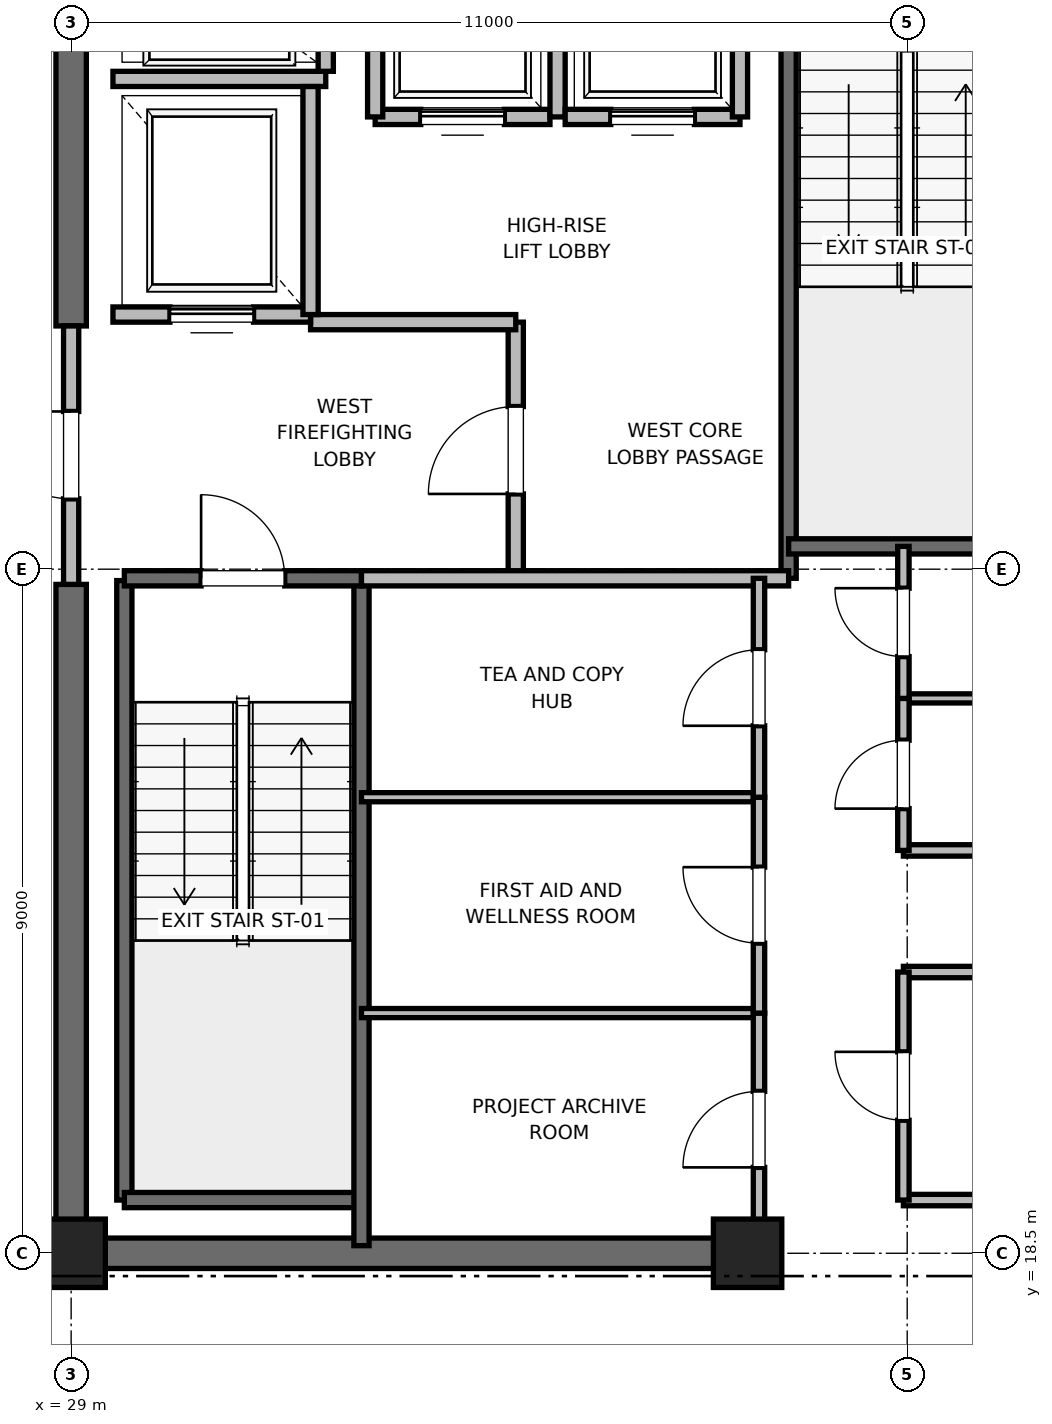
"""IFC4 building model, lengths in metres.
Left out: names, types, materials, properties, quantities, classifications, styles, units other than length and angle.
Written with IfcOpenShell. Run it as: python <this file> out.ifc"""

import sys

from ifc_helpers import new_model, si_unit, direction, frame, frame_2d, origin, origin_2d, place, context, subcontext, project, spatial, rectangle, extrude, element, fill, save


model = new_model("IFC4")
c1 = context("Model", 3, precision=1e-05, world=origin(), true_north=direction((0.0, 1.0)))
c2 = subcontext(c1, "Body", "Model", "MODEL_VIEW")
j1 = project(units=[si_unit("LENGTHUNIT", "METRE"), si_unit("PLANEANGLEUNIT", "RADIAN")], contexts=[c1])
p1 = place(None, origin())
s1 = spatial("IfcSite", under=j1, at=p1, CompositionType="ELEMENT")
p2 = place(p1, origin())
s2 = spatial("IfcBuilding", under=s1, at=p2, CompositionType="ELEMENT")
p3 = place(p2, frame((0.0, 0.0, 306.8)))
s3 = spatial("IfcBuildingStorey", under=s2, at=p3, CompositionType="ELEMENT", Elevation=306.8)
for number, where, z_axis, x_axis in (
    (1, (29.0, 18.5, 0.0), (0.0, 0.0, 1.0), (1.0, 0.0, 0.0)),
    (2, (37.9, 18.5, 0.0), (0.0, 0.0, 1.0), (1.0, 0.0, 0.0)),
):
    element("IfcColumn", number, at=place(p3, frame(where, z_axis=z_axis, x_axis=x_axis)), inside=s3, PredefinedType="PILASTER", context=c2, shape_type="SweptSolid", body=[
        extrude(rectangle(XDim=0.9, YDim=0.9, at=origin_2d()), origin(), (0.0, 0.0, 1.0), 4.0),
    ])
p4 = place(p3, frame((29.0, 18.5, 0.0), z_axis=(0.0, 0.0, 1.0), x_axis=(1.0, 0.0, 0.0)))
e3 = element("IfcWall", 3, at=p4, inside=s3, PredefinedType="SHEAR", context=c2, shape_type="SweptSolid", body=[
    extrude(rectangle(XDim=9.2, YDim=0.4, at=frame_2d((4.6, 0.0))), origin(), (0.0, 0.0, 1.0), 3.785),
])
p5 = place(p3, frame((29.0, 18.5, 0.0), z_axis=(0.0, 0.0, 1.0), x_axis=(0.0, 1.0, 0.0)))
e4 = element("IfcWall", 4, at=p5, inside=s3, PredefinedType="SHEAR", context=c2, shape_type="SweptSolid", body=[
    extrude(rectangle(XDim=8.8, YDim=0.4, at=frame_2d((4.4, 0.0))), origin(), (0.0, 0.0, 1.0), 3.785),
])
p6 = place(p3, frame((29.0, 30.7, 0.0), z_axis=(0.0, 0.0, 1.0), x_axis=(0.0, 1.0, 0.0)))
e5 = element("IfcWall", 5, at=p6, inside=s3, PredefinedType="SHEAR", context=c2, shape_type="SweptSolid", body=[
    extrude(rectangle(XDim=5.8, YDim=0.4, at=frame_2d((2.9, 0.0))), origin(), (0.0, 0.0, 1.0), 3.785),
])
p7 = place(p3, frame((29.7, 19.2, 0.0), z_axis=(0.0, 0.0, 1.0), x_axis=(0.0, 1.0, 0.0)))
e6 = element("IfcWall", 6, at=p7, inside=s3, PredefinedType="SOLIDWALL", context=c2, shape_type="SweptSolid", body=[
    extrude(rectangle(XDim=8.15, YDim=0.2, at=frame_2d((4.075, 0.0))), origin(), (0.0, 0.0, 1.0), 3.785),
])
p8 = place(p3, frame((29.7, 19.2, 0.0), z_axis=(0.0, 0.0, 1.0), x_axis=(1.0, 0.0, 0.0)))
e7 = element("IfcWall", 7, at=p8, inside=s3, PredefinedType="SOLIDWALL", context=c2, shape_type="SweptSolid", body=[
    extrude(rectangle(XDim=3.12, YDim=0.2, at=frame_2d((1.56, 0.0))), origin(), (0.0, 0.0, 1.0), 3.785),
])
p9 = place(p3, frame((32.82, 18.6, 0.0), z_axis=(0.0, 0.0, 1.0), x_axis=(0.0, 1.0, 0.0)))
e8 = element("IfcWall", 8, at=p9, inside=s3, PredefinedType="SOLIDWALL", context=c2, shape_type="SweptSolid", body=[
    extrude(rectangle(XDim=8.78, YDim=0.2, at=frame_2d((4.39, 0.0))), origin(), (0.0, 0.0, 1.0), 3.785),
])
p10 = place(p3, frame((29.7, 27.38, 0.0), z_axis=(0.0, 0.0, 1.0), x_axis=(1.0, 0.0, 0.0)))
e9 = element("IfcWall", 9, at=p10, inside=s3, PredefinedType="SOLIDWALL", context=c2, shape_type="SweptSolid", body=[
    extrude(rectangle(XDim=3.12, YDim=0.2, at=frame_2d((1.56, 0.0))), origin(), (0.0, 0.0, 1.0), 3.785),
])
p11 = place(p10, frame((1.01, 0.0, 0.0)))
e10 = element("IfcOpeningElement", 10, at=p11, cuts=e9, PredefinedType="OPENING", context=c2, shape_type="SweptSolid", body=[
    extrude(rectangle(XDim=1.1, YDim=2.15, at=frame_2d((0.55, 1.075))), frame((0.0, 0.1, 0.0), z_axis=(0.0, -1.0, 0.0), x_axis=(1.0, 0.0, 0.0)), (0.0, 0.0, 1.0), 0.2),
])
p12 = place(p3, frame((38.44, 27.38, 0.0), z_axis=(0.0, 0.0, 1.0), x_axis=(0.0, 1.0, 0.0)))
e11 = element("IfcWall", 11, at=p12, inside=s3, PredefinedType="SOLIDWALL", context=c2, shape_type="SweptSolid", body=[
    extrude(rectangle(XDim=8.87, YDim=0.2, at=frame_2d((4.435, 0.0))), origin(), (0.0, 0.0, 1.0), 3.785),
])
p13 = place(p3, frame((38.44, 27.8, 0.0), z_axis=(0.0, 0.0, 1.0), x_axis=(1.0, 0.0, 0.0)))
e12 = element("IfcWall", 12, at=p13, inside=s3, PredefinedType="SOLIDWALL", context=c2, shape_type="SweptSolid", body=[
    extrude(rectangle(XDim=3.32, YDim=0.2, at=frame_2d((1.66, 0.0))), origin(), (0.0, 0.0, 1.0), 3.785),
])
p14 = place(p3, frame((34.85, 27.38, 0.0), z_axis=(0.0, 0.0, 1.0), x_axis=(0.0, 1.0, 0.0)))
e13 = element("IfcWall", 13, at=p14, inside=s3, PredefinedType="PARTITIONING", context=c2, shape_type="SweptSolid", body=[
    extrude(rectangle(XDim=3.37, YDim=0.2, at=frame_2d((1.685, 0.0))), origin(), (0.0, 0.0, 1.0), 3.785),
])
p15 = place(p14, frame((1.11, 0.0, 0.0)))
e14 = element("IfcOpeningElement", 14, at=p15, cuts=e13, PredefinedType="OPENING", context=c2, shape_type="SweptSolid", body=[
    extrude(rectangle(XDim=1.15, YDim=2.2, at=frame_2d((0.575, 1.1))), frame((0.0, 0.1, 0.0), z_axis=(0.0, -1.0, 0.0), x_axis=(1.0, 0.0, 0.0)), (0.0, 0.0, 1.0), 0.2),
])
p16 = place(p3, frame((29.0, 27.3, 0.0), z_axis=(0.0, 0.0, 1.0), x_axis=(0.0, 1.0, 0.0)))
e15 = element("IfcWall", 15, at=p16, inside=s3, PredefinedType="PARTITIONING", context=c2, shape_type="SweptSolid", body=[
    extrude(rectangle(XDim=3.4, YDim=0.2, at=frame_2d((1.7, 0.0))), origin(), (0.0, 0.0, 1.0), 2.865),
])
p17 = place(p16, frame((1.125, 0.0, 0.0)))
e16 = element("IfcOpeningElement", 16, at=p17, cuts=e15, PredefinedType="OPENING", context=c2, shape_type="SweptSolid", body=[
    extrude(rectangle(XDim=1.15, YDim=2.2, at=frame_2d((0.575, 1.1))), frame((0.0, 0.1, 0.0), z_axis=(0.0, -1.0, 0.0), x_axis=(1.0, 0.0, 0.0)), (0.0, 0.0, 1.0), 0.2),
])
p18 = place(p3, frame((32.82, 27.38, 0.0), z_axis=(0.0, 0.0, 1.0), x_axis=(1.0, 0.0, 0.0)))
e17 = element("IfcWall", 17, at=p18, inside=s3, PredefinedType="PARTITIONING", context=c2, shape_type="SweptSolid", body=[
    extrude(rectangle(XDim=5.62, YDim=0.2, at=frame_2d((2.81, 0.0))), origin(), (0.0, 0.0, 1.0), 3.785),
])
p19 = place(p3, frame((32.15, 30.75, 0.0), z_axis=(0.0, 0.0, 1.0), x_axis=(1.0, 0.0, 0.0)))
e18 = element("IfcWall", 18, at=p19, inside=s3, PredefinedType="PARTITIONING", context=c2, shape_type="SweptSolid", body=[
    extrude(rectangle(XDim=2.7, YDim=0.2, at=frame_2d((1.35, 0.0))), origin(), (0.0, 0.0, 1.0), 3.785),
])
p20 = place(p3, frame((29.55, 30.85, 0.0), z_axis=(0.0, 0.0, 1.0), x_axis=(1.0, 0.0, 0.0)))
e19 = element("IfcWall", 19, at=p20, inside=s3, PredefinedType="SOLIDWALL", context=c2, shape_type="SweptSolid", body=[
    extrude(rectangle(XDim=2.6, YDim=0.2, at=frame_2d((1.3, 0.0))), origin(), (0.0, 0.0, 1.0), 2.865),
])
p21 = place(p20, frame((0.75, 0.0, 0.0)))
e20 = element("IfcOpeningElement", 20, at=p21, cuts=e19, PredefinedType="OPENING", context=c2, shape_type="SweptSolid", body=[
    extrude(rectangle(XDim=1.1, YDim=2.2, at=frame_2d((0.55, 1.1))), frame((0.0, 0.1, 0.0), z_axis=(0.0, -1.0, 0.0), x_axis=(1.0, 0.0, 0.0)), (0.0, 0.0, 1.0), 0.2),
])
p22 = place(p3, frame((29.55, 33.95, 0.0), z_axis=(0.0, 0.0, 1.0), x_axis=(1.0, 0.0, 0.0)))
e21 = element("IfcWall", 21, at=p22, inside=s3, PredefinedType="SOLIDWALL", context=c2, shape_type="SweptSolid", body=[
    extrude(rectangle(XDim=2.8, YDim=0.2, at=frame_2d((1.4, 0.0))), origin(), (0.0, 0.0, 1.0), 3.785),
])
p23 = place(p3, frame((32.15, 30.85, 0.0), z_axis=(0.0, 0.0, 1.0), x_axis=(0.0, 1.0, 0.0)))
e22 = element("IfcWall", 22, at=p23, inside=s3, PredefinedType="SOLIDWALL", context=c2, shape_type="SweptSolid", body=[
    extrude(rectangle(XDim=3.0, YDim=0.2, at=frame_2d((1.5, 0.0))), origin(), (0.0, 0.0, 1.0), 3.785),
])
p24 = place(p3, frame((32.35, 34.05, 0.0), z_axis=(0.0, 0.0, 1.0), x_axis=(0.0, 1.0, 0.0)))
e23 = element("IfcWall", 23, at=p24, inside=s3, PredefinedType="SOLIDWALL", context=c2, shape_type="SweptSolid", body=[
    extrude(rectangle(XDim=2.1, YDim=0.2, at=frame_2d((1.05, 0.0))), origin(), (0.0, 0.0, 1.0), 3.785),
])
p25 = place(p24, frame((0.5, 0.0, 0.0)))
e24 = element("IfcOpeningElement", 24, at=p25, cuts=e23, PredefinedType="OPENING", context=c2, shape_type="SweptSolid", body=[
    extrude(rectangle(XDim=1.1, YDim=2.2, at=frame_2d((0.55, 1.1))), frame((0.0, 0.1, 0.0), z_axis=(0.0, -1.0, 0.0), x_axis=(1.0, 0.0, 0.0)), (0.0, 0.0, 1.0), 0.2),
])
p26 = place(p3, frame((33.0, 33.45, 0.0), z_axis=(0.0, 0.0, 1.0), x_axis=(1.0, 0.0, 0.0)))
e25 = element("IfcWall", 25, at=p26, inside=s3, PredefinedType="SOLIDWALL", context=c2, shape_type="SweptSolid", body=[
    extrude(rectangle(XDim=2.3, YDim=0.2, at=frame_2d((1.15, 0.0))), origin(), (0.0, 0.0, 1.0), 3.785),
])
p27 = place(p26, frame((0.6, 0.0, 0.0)))
e26 = element("IfcOpeningElement", 26, at=p27, cuts=e25, PredefinedType="OPENING", context=c2, shape_type="SweptSolid", body=[
    extrude(rectangle(XDim=1.1, YDim=2.2, at=frame_2d((0.55, 1.1))), frame((0.0, 0.1, 0.0), z_axis=(0.0, -1.0, 0.0), x_axis=(1.0, 0.0, 0.0)), (0.0, 0.0, 1.0), 0.2),
])
p28 = place(p3, frame((33.0, 36.05, 0.0), z_axis=(0.0, 0.0, 1.0), x_axis=(0.0, -1.0, 0.0)))
e27 = element("IfcWall", 27, at=p28, inside=s3, PredefinedType="SOLIDWALL", context=c2, shape_type="SweptSolid", body=[
    extrude(rectangle(XDim=2.6, YDim=0.2, at=frame_2d((1.3, 0.0))), origin(), (0.0, 0.0, 1.0), 3.785),
])
p29 = place(p3, frame((35.4, 33.45, 0.0), z_axis=(0.0, 0.0, 1.0), x_axis=(0.0, 1.0, 0.0)))
e28 = element("IfcWall", 28, at=p29, inside=s3, PredefinedType="SOLIDWALL", context=c2, shape_type="SweptSolid", body=[
    extrude(rectangle(XDim=2.6, YDim=0.2, at=frame_2d((1.3, 0.0))), origin(), (0.0, 0.0, 1.0), 2.865),
])
p30 = place(p3, frame((35.5, 33.45, 0.0), z_axis=(0.0, 0.0, 1.0), x_axis=(1.0, 0.0, 0.0)))
e29 = element("IfcWall", 29, at=p30, inside=s3, PredefinedType="SOLIDWALL", context=c2, shape_type="SweptSolid", body=[
    extrude(rectangle(XDim=2.3, YDim=0.2, at=frame_2d((1.15, 0.0))), origin(), (0.0, 0.0, 1.0), 3.785),
])
p31 = place(p30, frame((0.6, 0.0, 0.0)))
e30 = element("IfcOpeningElement", 30, at=p31, cuts=e29, PredefinedType="OPENING", context=c2, shape_type="SweptSolid", body=[
    extrude(rectangle(XDim=1.1, YDim=2.2, at=frame_2d((0.55, 1.1))), frame((0.0, 0.1, 0.0), z_axis=(0.0, -1.0, 0.0), x_axis=(1.0, 0.0, 0.0)), (0.0, 0.0, 1.0), 0.2),
])
p32 = place(p3, frame((37.8, 33.45, 0.0), z_axis=(0.0, 0.0, 1.0), x_axis=(0.0, 1.0, 0.0)))
e31 = element("IfcWall", 31, at=p32, inside=s3, PredefinedType="SOLIDWALL", context=c2, shape_type="SweptSolid", body=[
    extrude(rectangle(XDim=2.6, YDim=0.2, at=frame_2d((1.3, 0.0))), origin(), (0.0, 0.0, 1.0), 2.865),
])
for number, where, z_axis, x_axis in (
    (32, (39.95, 19.2, 0.0), (0.0, 0.0, 1.0), (1.0, 0.0, 0.0)),
    (33, (39.95, 22.2, 0.0), (0.0, 0.0, 1.0), (1.0, 0.0, 0.0)),
    (34, (39.95, 23.8, 0.0), (0.0, 0.0, 1.0), (1.0, 0.0, 0.0)),
):
    element("IfcWall", number, at=place(p3, frame(where, z_axis=z_axis, x_axis=x_axis)), inside=s3, PredefinedType="PARTITIONING", context=c2, shape_type="SweptSolid", body=[
        extrude(rectangle(XDim=1.81, YDim=0.15, at=frame_2d((0.905, 0.0))), origin(), (0.0, 0.0, 1.0), 2.85),
    ])
p33 = place(p3, frame((39.95, 25.8, 0.0), z_axis=(0.0, 0.0, 1.0), x_axis=(1.0, 0.0, 0.0)))
e35 = element("IfcWall", 35, at=p33, inside=s3, PredefinedType="PARTITIONING", context=c2, shape_type="SweptSolid", body=[
    extrude(rectangle(XDim=1.81, YDim=0.12, at=frame_2d((0.905, 0.0))), origin(), (0.0, 0.0, 1.0), 2.85),
])
p34 = place(p3, frame((39.95, 19.2, 0.0), z_axis=(0.0, 0.0, 1.0), x_axis=(0.0, 1.0, 0.0)))
e36 = element("IfcWall", 36, at=p34, inside=s3, PredefinedType="PARTITIONING", context=c2, shape_type="SweptSolid", body=[
    extrude(rectangle(XDim=3.0, YDim=0.15, at=frame_2d((1.5, 0.0))), origin(), (0.0, 0.0, 1.0), 2.85),
])
p35 = place(p34, frame((1.05, 0.0, 0.0)))
e37 = element("IfcOpeningElement", 37, at=p35, cuts=e36, PredefinedType="OPENING", context=c2, shape_type="SweptSolid", body=[
    extrude(rectangle(XDim=0.9, YDim=2.1, at=frame_2d((0.45, 1.05))), frame((0.0, 0.075, 0.0), z_axis=(0.0, -1.0, 0.0), x_axis=(1.0, 0.0, 0.0)), (0.0, 0.0, 1.0), 0.15),
])
p36 = place(p3, frame((39.95, 23.8, 0.0), z_axis=(0.0, 0.0, 1.0), x_axis=(0.0, 1.0, 0.0)))
e38 = element("IfcWall", 38, at=p36, inside=s3, PredefinedType="PARTITIONING", context=c2, shape_type="SweptSolid", body=[
    extrude(rectangle(XDim=2.0, YDim=0.15, at=frame_2d((1.0, 0.0))), origin(), (0.0, 0.0, 1.0), 2.85),
])
p37 = place(p36, frame((0.55, 0.0, 0.0)))
e39 = element("IfcOpeningElement", 39, at=p37, cuts=e38, PredefinedType="OPENING", context=c2, shape_type="SweptSolid", body=[
    extrude(rectangle(XDim=0.9, YDim=2.1, at=frame_2d((0.45, 1.05))), frame((0.0, 0.075, 0.0), z_axis=(0.0, -1.0, 0.0), x_axis=(1.0, 0.0, 0.0)), (0.0, 0.0, 1.0), 0.15),
])
p38 = place(p3, frame((39.95, 25.8, 0.0), z_axis=(0.0, 0.0, 1.0), x_axis=(0.0, 1.0, 0.0)))
e40 = element("IfcWall", 40, at=p38, inside=s3, PredefinedType="PARTITIONING", context=c2, shape_type="SweptSolid", body=[
    extrude(rectangle(XDim=2.0, YDim=0.15, at=frame_2d((1.0, 0.0))), origin(), (0.0, 0.0, 1.0), 2.85),
])
p39 = place(p38, frame((0.55, 0.0, 0.0)))
e41 = element("IfcOpeningElement", 41, at=p39, cuts=e40, PredefinedType="OPENING", context=c2, shape_type="SweptSolid", body=[
    extrude(rectangle(XDim=0.9, YDim=2.1, at=frame_2d((0.45, 1.05))), frame((0.0, 0.075, 0.0), z_axis=(0.0, -1.0, 0.0), x_axis=(1.0, 0.0, 0.0)), (0.0, 0.0, 1.0), 0.15),
])
for number, where, z_axis, x_axis in (
    (42, (32.82, 21.66, 0.0), (0.0, 0.0, 1.0), (1.0, 0.0, 0.0)),
    (43, (32.82, 24.5, 0.0), (0.0, 0.0, 1.0), (1.0, 0.0, 0.0)),
):
    element("IfcWall", number, at=place(p3, frame(where, z_axis=z_axis, x_axis=x_axis)), inside=s3, PredefinedType="PARTITIONING", context=c2, shape_type="SweptSolid", body=[
        extrude(rectangle(XDim=5.23, YDim=0.12, at=frame_2d((2.615, 0.0))), origin(), (0.0, 0.0, 1.0), 2.85),
    ])
p40 = place(p3, frame((38.05, 18.6, 0.0), z_axis=(0.0, 0.0, 1.0), x_axis=(0.0, 1.0, 0.0)))
e44 = element("IfcWall", 44, at=p40, inside=s3, PredefinedType="PARTITIONING", context=c2, shape_type="SweptSolid", body=[
    extrude(rectangle(XDim=3.06, YDim=0.15, at=frame_2d((1.53, 0.0))), origin(), (0.0, 0.0, 1.0), 2.85),
])
p41 = place(p40, frame((1.03, 0.0, 0.0)))
e45 = element("IfcOpeningElement", 45, at=p41, cuts=e44, PredefinedType="OPENING", context=c2, shape_type="SweptSolid", body=[
    extrude(rectangle(XDim=1.0, YDim=2.15, at=frame_2d((0.5, 1.075))), frame((0.0, 0.075, 0.0), z_axis=(0.0, -1.0, 0.0), x_axis=(1.0, 0.0, 0.0)), (0.0, 0.0, 1.0), 0.15),
])
p42 = place(p3, frame((38.05, 21.66, 0.0), z_axis=(0.0, 0.0, 1.0), x_axis=(0.0, 1.0, 0.0)))
e46 = element("IfcWall", 46, at=p42, inside=s3, PredefinedType="PARTITIONING", context=c2, shape_type="SweptSolid", body=[
    extrude(rectangle(XDim=2.84, YDim=0.15, at=frame_2d((1.42, 0.0))), origin(), (0.0, 0.0, 1.0), 2.85),
])
p43 = place(p42, frame((0.92, 0.0, 0.0)))
e47 = element("IfcOpeningElement", 47, at=p43, cuts=e46, PredefinedType="OPENING", context=c2, shape_type="SweptSolid", body=[
    extrude(rectangle(XDim=1.0, YDim=2.15, at=frame_2d((0.5, 1.075))), frame((0.0, 0.075, 0.0), z_axis=(0.0, -1.0, 0.0), x_axis=(1.0, 0.0, 0.0)), (0.0, 0.0, 1.0), 0.15),
])
p44 = place(p3, frame((38.05, 24.5, 0.0), z_axis=(0.0, 0.0, 1.0), x_axis=(0.0, 1.0, 0.0)))
e48 = element("IfcWall", 48, at=p44, inside=s3, PredefinedType="PARTITIONING", context=c2, shape_type="SweptSolid", body=[
    extrude(rectangle(XDim=2.88, YDim=0.15, at=frame_2d((1.44, 0.0))), origin(), (0.0, 0.0, 1.0), 2.85),
])
p45 = place(p44, frame((0.94, 0.0, 0.0)))
e49 = element("IfcOpeningElement", 49, at=p45, cuts=e48, PredefinedType="OPENING", context=c2, shape_type="SweptSolid", body=[
    extrude(rectangle(XDim=1.0, YDim=2.15, at=frame_2d((0.5, 1.075))), frame((0.0, 0.075, 0.0), z_axis=(0.0, -1.0, 0.0), x_axis=(1.0, 0.0, 0.0)), (0.0, 0.0, 1.0), 0.15),
])
p46 = place(p11, origin())
e50 = element("IfcDoor", 50, at=p46, inside=s3, OperationType="SINGLE_SWING_LEFT", PredefinedType="DOOR", context=c2, shape_type="SweptSolid", body=[
    extrude(rectangle(XDim=1.1, YDim=2.15, at=frame_2d((0.55, 1.075))), frame((0.0, 0.025, 0.0), z_axis=(0.0, -1.0, 0.0), x_axis=(1.0, 0.0, 0.0)), (0.0, 0.0, 1.0), 0.05),
])
fill(e10, e50)
p47 = place(p15, origin())
e51 = element("IfcDoor", 51, at=p47, inside=s3, OperationType="SINGLE_SWING_LEFT", PredefinedType="DOOR", context=c2, shape_type="SweptSolid", body=[
    extrude(rectangle(XDim=1.15, YDim=2.2, at=frame_2d((0.575, 1.1))), frame((0.0, 0.025, 0.0), z_axis=(0.0, -1.0, 0.0), x_axis=(1.0, 0.0, 0.0)), (0.0, 0.0, 1.0), 0.05),
])
fill(e14, e51)
p48 = place(p17, origin())
e52 = element("IfcDoor", 52, at=p48, inside=s3, OperationType="SINGLE_SWING_RIGHT", PredefinedType="DOOR", context=c2, shape_type="SweptSolid", body=[
    extrude(rectangle(XDim=1.15, YDim=2.2, at=frame_2d((0.575, 1.1))), frame((0.0, 0.025, 0.0), z_axis=(0.0, -1.0, 0.0), x_axis=(1.0, 0.0, 0.0)), (0.0, 0.0, 1.0), 0.05),
])
fill(e16, e52)
p49 = place(p21, origin())
e53 = element("IfcDoor", 53, at=p49, inside=s3, OperationType="SLIDING_TO_RIGHT", PredefinedType="DOOR", context=c2, shape_type="SweptSolid", body=[
    extrude(rectangle(XDim=1.1, YDim=2.2, at=frame_2d((0.55, 1.1))), frame((0.0, 0.025, 0.0), z_axis=(0.0, -1.0, 0.0), x_axis=(1.0, 0.0, 0.0)), (0.0, 0.0, 1.0), 0.05),
])
fill(e20, e53)
p50 = place(p27, origin())
e54 = element("IfcDoor", 54, at=p50, inside=s3, OperationType="SLIDING_TO_RIGHT", PredefinedType="DOOR", context=c2, shape_type="SweptSolid", body=[
    extrude(rectangle(XDim=1.1, YDim=2.2, at=frame_2d((0.55, 1.1))), frame((0.0, 0.025, 0.0), z_axis=(0.0, -1.0, 0.0), x_axis=(1.0, 0.0, 0.0)), (0.0, 0.0, 1.0), 0.05),
])
fill(e26, e54)
p51 = place(p31, origin())
e55 = element("IfcDoor", 55, at=p51, inside=s3, OperationType="SLIDING_TO_RIGHT", PredefinedType="DOOR", context=c2, shape_type="SweptSolid", body=[
    extrude(rectangle(XDim=1.1, YDim=2.2, at=frame_2d((0.55, 1.1))), frame((0.0, 0.025, 0.0), z_axis=(0.0, -1.0, 0.0), x_axis=(1.0, 0.0, 0.0)), (0.0, 0.0, 1.0), 0.05),
])
fill(e30, e55)
p52 = place(p35, origin())
e56 = element("IfcDoor", 56, at=p52, inside=s3, OperationType="SINGLE_SWING_RIGHT", PredefinedType="DOOR", context=c2, shape_type="SweptSolid", body=[
    extrude(rectangle(XDim=0.9, YDim=2.1, at=frame_2d((0.45, 1.05))), frame((0.0, 0.025, 0.0), z_axis=(0.0, -1.0, 0.0), x_axis=(1.0, 0.0, 0.0)), (0.0, 0.0, 1.0), 0.05),
])
fill(e37, e56)
p53 = place(p37, origin())
e57 = element("IfcDoor", 57, at=p53, inside=s3, OperationType="SINGLE_SWING_LEFT", PredefinedType="DOOR", context=c2, shape_type="SweptSolid", body=[
    extrude(rectangle(XDim=0.9, YDim=2.1, at=frame_2d((0.45, 1.05))), frame((0.0, 0.025, 0.0), z_axis=(0.0, -1.0, 0.0), x_axis=(1.0, 0.0, 0.0)), (0.0, 0.0, 1.0), 0.05),
])
fill(e39, e57)
p54 = place(p39, origin())
e58 = element("IfcDoor", 58, at=p54, inside=s3, OperationType="SINGLE_SWING_RIGHT", PredefinedType="DOOR", context=c2, shape_type="SweptSolid", body=[
    extrude(rectangle(XDim=0.9, YDim=2.1, at=frame_2d((0.45, 1.05))), frame((0.0, 0.025, 0.0), z_axis=(0.0, -1.0, 0.0), x_axis=(1.0, 0.0, 0.0)), (0.0, 0.0, 1.0), 0.05),
])
fill(e41, e58)
p55 = place(p41, origin())
e59 = element("IfcDoor", 59, at=p55, inside=s3, OperationType="SINGLE_SWING_LEFT", PredefinedType="DOOR", context=c2, shape_type="SweptSolid", body=[
    extrude(rectangle(XDim=1.0, YDim=2.15, at=frame_2d((0.5, 1.075))), frame((0.0, 0.025, 0.0), z_axis=(0.0, -1.0, 0.0), x_axis=(1.0, 0.0, 0.0)), (0.0, 0.0, 1.0), 0.05),
])
fill(e45, e59)
p56 = place(p43, origin())
e60 = element("IfcDoor", 60, at=p56, inside=s3, OperationType="SINGLE_SWING_RIGHT", PredefinedType="DOOR", context=c2, shape_type="SweptSolid", body=[
    extrude(rectangle(XDim=1.0, YDim=2.15, at=frame_2d((0.5, 1.075))), frame((0.0, 0.025, 0.0), z_axis=(0.0, -1.0, 0.0), x_axis=(1.0, 0.0, 0.0)), (0.0, 0.0, 1.0), 0.05),
])
fill(e47, e60)
p57 = place(p45, origin())
e61 = element("IfcDoor", 61, at=p57, inside=s3, OperationType="SINGLE_SWING_LEFT", PredefinedType="DOOR", context=c2, shape_type="SweptSolid", body=[
    extrude(rectangle(XDim=1.0, YDim=2.15, at=frame_2d((0.5, 1.075))), frame((0.0, 0.025, 0.0), z_axis=(0.0, -1.0, 0.0), x_axis=(1.0, 0.0, 0.0)), (0.0, 0.0, 1.0), 0.05),
])
fill(e49, e61)
save(model, sys.argv[1])
